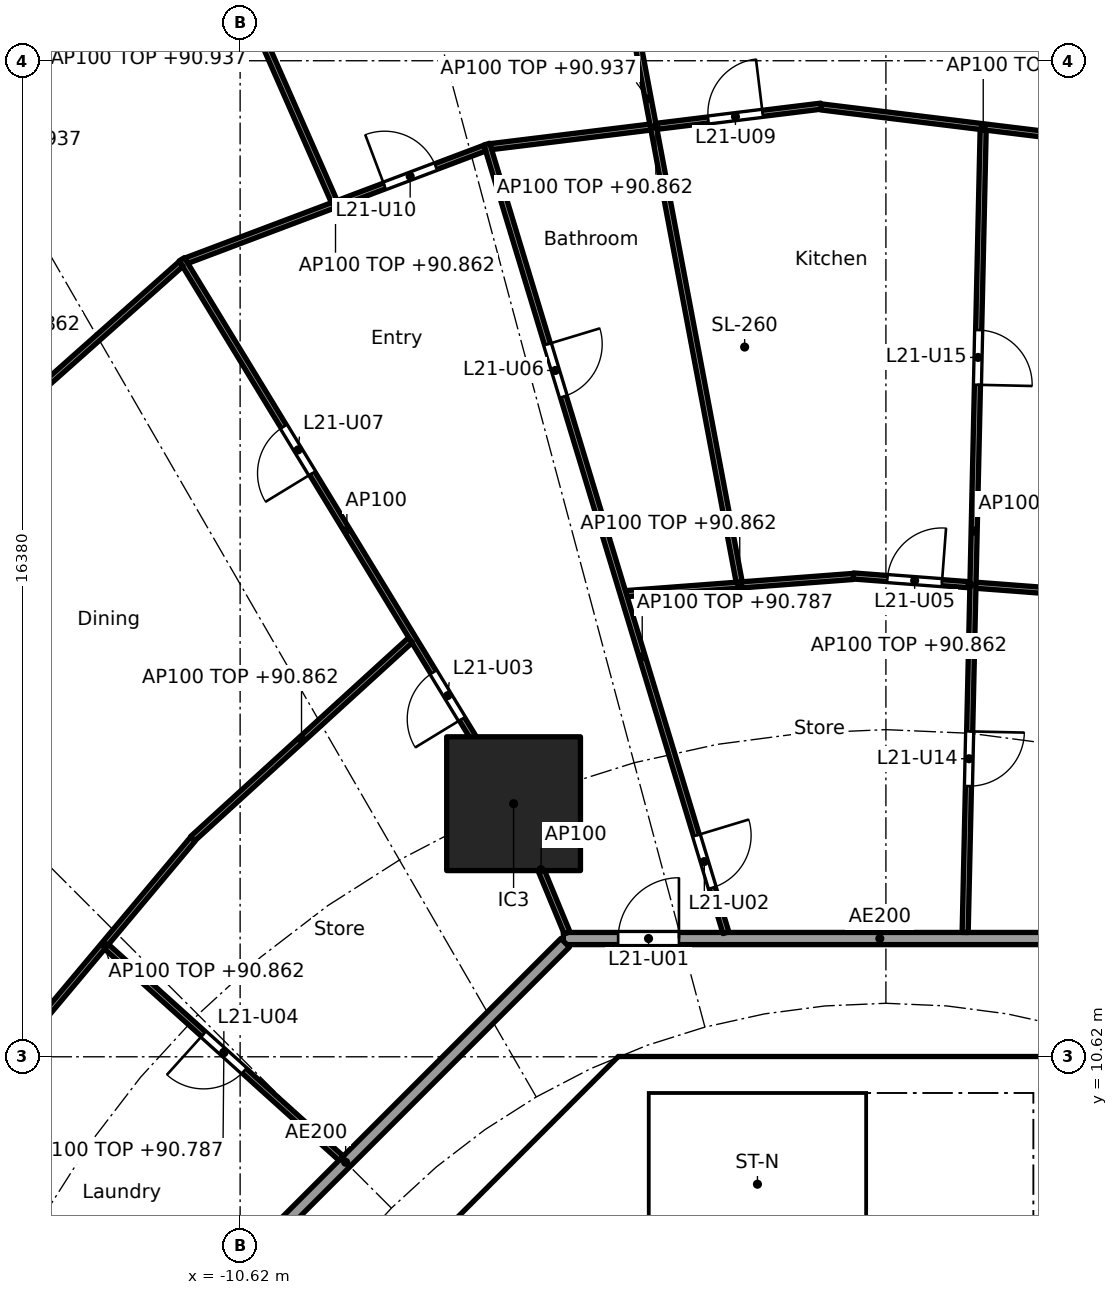
"""IFC4 building model, lengths in metres.
Left out: names, types, materials, properties, quantities, classifications, styles, units other than length and angle.
Written with IfcOpenShell. Run it as: python <this file> out.ifc"""

import sys

from ifc_helpers import new_model, si_unit, direction, frame, frame_2d, origin, origin_2d, place, context, subcontext, project, spatial, polyline, rectangle, outline, extrude, element, fill, save


model = new_model("IFC4")
c1 = context("Model", 3, precision=1e-05, world=origin(), true_north=direction((0.0, 1.0)))
c2 = subcontext(c1, "Body", "Model", "MODEL_VIEW")
j1 = project(units=[si_unit("LENGTHUNIT", "METRE"), si_unit("PLANEANGLEUNIT", "RADIAN")], contexts=[c1])
p1 = place(None, origin())
s1 = spatial("IfcSite", under=j1, at=p1, CompositionType="ELEMENT")
p2 = place(p1, origin())
s2 = spatial("IfcBuilding", under=s1, at=p2, CompositionType="ELEMENT")
p3 = place(p2, frame((0.0, 0.0, 88.1)))
s3 = spatial("IfcBuildingStorey", under=s2, at=p3, CompositionType="ELEMENT", Elevation=88.1)
p4 = place(p3, frame((-6.123, 14.782, 0.0), z_axis=(0.0, 0.0, 1.0), x_axis=(1.0, 0.0, 0.0)))
e1 = element("IfcColumn", 1, at=p4, inside=s3, PredefinedType="COLUMN", context=c2, shape_type="SweptSolid", body=[
    extrude(rectangle(XDim=2.2, YDim=2.2, at=origin_2d()), origin(), (0.0, 0.0, 1.0), 3.7),
])
p5 = place(p3, frame((-4.613, 9.988, 0.0), z_axis=(0.0, 0.0, 1.0), x_axis=(-0.707106781187, -0.707106781187, 0.0)))
e2 = element("IfcWall", 2, at=p5, inside=s3, PredefinedType="SHEAR", context=c2, shape_type="SweptSolid", body=[
    extrude(rectangle(XDim=7.602, YDim=0.6, at=frame_2d((3.801, 0.0))), origin(), (0.0, 0.0, 1.0), 3.44),
])
p6 = place(p5, frame((0.351, 0.0, 0.0)))
e3 = element("IfcOpeningElement", 3, at=p6, cuts=e2, PredefinedType="OPENING", context=c2, shape_type="SweptSolid", body=[
    extrude(rectangle(XDim=1.1, YDim=2.1, at=frame_2d((0.55, 1.05))), frame((0.0, 0.31, 0.0), z_axis=(0.0, -1.0, 0.0), x_axis=(1.0, 0.0, 0.0)), (0.0, 0.0, 1.0), 0.62),
])
p7 = place(p3, frame((-5.8, 4.3, 0.0), z_axis=(0.0, 0.0, 1.0), x_axis=(0.0, 1.0, 0.0)))
e4 = element("IfcWall", 4, at=p7, inside=s3, PredefinedType="PARTITIONING", context=c2, shape_type="SweptSolid", body=[
    extrude(rectangle(XDim=3.927, YDim=0.15, at=frame_2d((1.963, 0.0))), origin(), (0.0, 0.0, 1.0), 3.44),
])
p8 = place(p7, frame((1.551, 0.0, 0.0)))
e5 = element("IfcOpeningElement", 5, at=p8, cuts=e4, PredefinedType="OPENING", context=c2, shape_type="SweptSolid", body=[
    extrude(rectangle(XDim=0.9, YDim=2.1, at=frame_2d((0.45, 1.05))), frame((0.0, 0.085, 0.0), z_axis=(0.0, -1.0, 0.0), x_axis=(1.0, 0.0, 0.0)), (0.0, 0.0, 1.0), 0.17),
])
p9 = place(p3, origin())
e6 = element("IfcWall", 6, at=p9, inside=s3, PredefinedType="SHEAR", context=c2, shape_type="SweptSolid", body=[
    extrude(outline(polyline([(-4.152, 10.025), (-4.401, 9.776), (-4.825, 10.2), (-4.401, 10.625), (4.401, 10.625), (4.825, 10.2), (4.401, 9.776), (4.152, 10.025), (-4.152, 10.025)])), origin(), (0.0, 0.0, 1.0), 3.44),
])
p10 = place(p3, origin())
e7 = element("IfcWall", 7, at=p10, inside=s3, PredefinedType="SOLIDWALL", context=c2, shape_type="SweptSolid", body=[
    extrude(outline(polyline([(-3.9, 7.025), (-4.1, 7.025), (-4.1, 10.025), (-3.9, 10.025), (-3.9, 7.025)])), origin(), (0.0, 0.0, 1.0), 3.44),
])
p11 = place(p3, frame((5.104, 12.565, 0.0), z_axis=(0.0, 0.0, 1.0), x_axis=(-1.0, 0.0, 0.0)))
e8 = element("IfcWall", 8, at=p11, inside=s3, PredefinedType="PARTITIONING", context=c2, shape_type="SweptSolid", body=[
    extrude(rectangle(XDim=10.409, YDim=0.2, at=frame_2d((5.205, 0.0))), origin(), (0.0, 0.0, 1.0), 3.44),
])
p12 = place(p11, frame((8.508, 0.0, 0.0)))
e9 = element("IfcOpeningElement", 9, at=p12, cuts=e8, PredefinedType="OPENING", context=c2, shape_type="SweptSolid", body=[
    extrude(rectangle(XDim=1.0, YDim=2.1, at=frame_2d((0.5, 1.05))), frame((0.0, 0.11, 0.0), z_axis=(0.0, -1.0, 0.0), x_axis=(1.0, 0.0, 0.0)), (0.0, 0.0, 1.0), 0.22),
])
p13 = place(p3, frame((-5.275, 12.494, 0.0), z_axis=(0.0, 0.0, 1.0), x_axis=(-0.707106781187, -0.707106781187, 0.0)))
e10 = element("IfcWall", 10, at=p13, inside=s3, PredefinedType="PARTITIONING", context=c2, shape_type="SweptSolid", body=[
    extrude(rectangle(XDim=10.209, YDim=0.2, at=frame_2d((5.104, 0.0))), origin(), (0.0, 0.0, 1.0), 3.44),
])
p14 = place(p3, frame((3.299, 18.237, 0.0), z_axis=(0.0, 0.0, 1.0), x_axis=(-0.997152243414, 0.075414875552, 0.0)))
e11 = element("IfcWall", 11, at=p14, inside=s3, PredefinedType="PARTITIONING", context=c2, shape_type="SweptSolid", body=[
    extrude(rectangle(XDim=3.846, YDim=0.1, at=frame_2d((1.923, 0.0))), origin(), (0.0, 0.0, 1.0), 2.762),
])
p15 = place(p14, frame((2.385, 0.0, 0.0)))
e12 = element("IfcOpeningElement", 12, at=p15, cuts=e11, PredefinedType="OPENING", context=c2, shape_type="SweptSolid", body=[
    extrude(rectangle(XDim=0.9, YDim=2.1, at=frame_2d((0.45, 1.05))), frame((0.0, 0.06, 0.0), z_axis=(0.0, -1.0, 0.0), x_axis=(1.0, 0.0, 0.0)), (0.0, 0.0, 1.0), 0.12),
])
p16 = place(p3, frame((4.267, 25.587, 0.0), z_axis=(0.0, 0.0, 1.0), x_axis=(-0.992576206119, 0.121624319302, 0.0)))
e13 = element("IfcWall", 13, at=p16, inside=s3, PredefinedType="PARTITIONING", context=c2, shape_type="SweptSolid", body=[
    extrude(rectangle(XDim=5.374, YDim=0.1, at=frame_2d((2.687, 0.0))), origin(), (0.0, 0.0, 1.0), 2.762),
])
p17 = place(p3, frame((1.303, 12.665, 0.0), z_axis=(0.0, 0.0, 1.0), x_axis=(0.022412244057, 0.999748814111, 0.0)))
e14 = element("IfcWall", 14, at=p17, inside=s3, PredefinedType="PARTITIONING", context=c2, shape_type="SweptSolid", body=[
    extrude(rectangle(XDim=13.203, YDim=0.1, at=frame_2d((6.601, 0.0))), origin(), (0.0, 0.0, 1.0), 2.687),
])
p18 = place(p17, frame((2.407, 0.0, 0.0)))
e15 = element("IfcOpeningElement", 15, at=p18, cuts=e14, PredefinedType="OPENING", context=c2, shape_type="SweptSolid", body=[
    extrude(rectangle(XDim=0.9, YDim=2.1, at=frame_2d((0.45, 1.05))), frame((0.0, 0.06, 0.0), z_axis=(0.0, -1.0, 0.0), x_axis=(1.0, 0.0, 0.0)), (0.0, 0.0, 1.0), 0.12),
])
p19 = place(p17, frame((9.009, 0.0, 0.0)))
e16 = element("IfcOpeningElement", 16, at=p19, cuts=e14, PredefinedType="OPENING", context=c2, shape_type="SweptSolid", body=[
    extrude(rectangle(XDim=0.9, YDim=2.1, at=frame_2d((0.45, 1.05))), frame((0.0, 0.06, 0.0), z_axis=(0.0, -1.0, 0.0), x_axis=(1.0, 0.0, 0.0)), (0.0, 0.0, 1.0), 0.12),
])
p20 = place(p3, frame((-0.536, 18.519, 0.0), z_axis=(0.0, 0.0, 1.0), x_axis=(-0.99715294352, -0.075405618017, 0.0)))
e17 = element("IfcWall", 17, at=p20, inside=s3, PredefinedType="PARTITIONING", context=c2, shape_type="SweptSolid", body=[
    extrude(rectangle(XDim=3.746, YDim=0.1, at=frame_2d((1.873, 0.0))), origin(), (0.0, 0.0, 1.0), 2.762),
])
p21 = place(p3, frame((-1.066, 26.253, 0.0), z_axis=(0.0, 0.0, 1.0), x_axis=(-0.992574853421, -0.121635358166, 0.0)))
e18 = element("IfcWall", 18, at=p21, inside=s3, PredefinedType="PARTITIONING", context=c2, shape_type="SweptSolid", body=[
    extrude(rectangle(XDim=5.473, YDim=0.1, at=frame_2d((2.737, 0.0))), origin(), (0.0, 0.0, 1.0), 2.762),
])
p22 = place(p21, frame((0.969, 0.0, 0.0)))
e19 = element("IfcOpeningElement", 19, at=p22, cuts=e18, PredefinedType="OPENING", context=c2, shape_type="SweptSolid", body=[
    extrude(rectangle(XDim=0.9, YDim=2.1, at=frame_2d((0.45, 1.05))), frame((0.0, 0.06, 0.0), z_axis=(0.0, -1.0, 0.0), x_axis=(1.0, 0.0, 0.0)), (0.0, 0.0, 1.0), 0.12),
])
p23 = place(p3, frame((-2.413, 18.427, 0.0), z_axis=(0.0, 0.0, 1.0), x_axis=(-0.185126823719, 0.982714637695, 0.0)))
e20 = element("IfcWall", 20, at=p23, inside=s3, PredefinedType="PARTITIONING", context=c2, shape_type="SweptSolid", body=[
    extrude(rectangle(XDim=16.176, YDim=0.1, at=frame_2d((8.088, 0.0))), origin(), (0.0, 0.0, 1.0), 2.837),
])
p24 = place(p3, frame((-2.631, 12.66, 0.0), z_axis=(0.0, 0.0, 1.0), x_axis=(-0.290161396499, 0.956977723869, 0.0)))
e21 = element("IfcWall", 21, at=p24, inside=s3, PredefinedType="PARTITIONING", context=c2, shape_type="SweptSolid", body=[
    extrude(rectangle(XDim=13.552, YDim=0.1, at=frame_2d((6.776, 0.0))), origin(), (0.0, 0.0, 1.0), 2.687),
])
p25 = place(p24, frame((0.772, 0.0, 0.0)))
e22 = element("IfcOpeningElement", 22, at=p25, cuts=e21, PredefinedType="OPENING", context=c2, shape_type="SweptSolid", body=[
    extrude(rectangle(XDim=0.9, YDim=2.1, at=frame_2d((0.45, 1.05))), frame((0.0, 0.06, 0.0), z_axis=(0.0, -1.0, 0.0), x_axis=(1.0, 0.0, 0.0)), (0.0, 0.0, 1.0), 0.12),
])
p26 = place(p24, frame((9.212, 0.0, 0.0)))
e23 = element("IfcOpeningElement", 23, at=p26, cuts=e21, PredefinedType="OPENING", context=c2, shape_type="SweptSolid", body=[
    extrude(rectangle(XDim=0.9, YDim=2.1, at=frame_2d((0.45, 1.05))), frame((0.0, 0.06, 0.0), z_axis=(0.0, -1.0, 0.0), x_axis=(1.0, 0.0, 0.0)), (0.0, 0.0, 1.0), 0.12),
])
p27 = place(p3, frame((-6.596, 25.563, 0.0), z_axis=(0.0, 0.0, 1.0), x_axis=(-0.9356162121, -0.353018843201, 0.0)))
e24 = element("IfcWall", 24, at=p27, inside=s3, PredefinedType="PARTITIONING", context=c2, shape_type="SweptSolid", body=[
    extrude(rectangle(XDim=5.249, YDim=0.1, at=frame_2d((2.625, 0.0))), origin(), (0.0, 0.0, 1.0), 2.762),
])
p28 = place(p27, frame((0.862, 0.0, 0.0)))
e25 = element("IfcOpeningElement", 25, at=p28, cuts=e24, PredefinedType="OPENING", context=c2, shape_type="SweptSolid", body=[
    extrude(rectangle(XDim=0.9, YDim=2.1, at=frame_2d((0.45, 1.05))), frame((0.0, 0.06, 0.0), z_axis=(0.0, -1.0, 0.0), x_axis=(1.0, 0.0, 0.0)), (0.0, 0.0, 1.0), 0.12),
])
p29 = place(p3, frame((-9.072, 24.683, 0.0), z_axis=(0.0, 0.0, 1.0), x_axis=(-0.403192911159, 0.915115007194, 0.0)))
e26 = element("IfcWall", 26, at=p29, inside=s3, PredefinedType="PARTITIONING", context=c2, shape_type="SweptSolid", body=[
    extrude(rectangle(XDim=8.211, YDim=0.1, at=frame_2d((4.106, 0.0))), origin(), (0.0, 0.0, 1.0), 2.837),
])
p30 = place(p29, frame((3.656, 0.0, 0.0)))
e27 = element("IfcOpeningElement", 27, at=p30, cuts=e26, PredefinedType="OPENING", context=c2, shape_type="SweptSolid", body=[
    extrude(rectangle(XDim=0.9, YDim=2.1, at=frame_2d((0.45, 1.05))), frame((0.0, 0.06, 0.0), z_axis=(0.0, -1.0, 0.0), x_axis=(1.0, 0.0, 0.0)), (0.0, 0.0, 1.0), 0.12),
])
p31 = place(p3, frame((-5.243, 12.657, 0.0), z_axis=(0.0, 0.0, 1.0), x_axis=(-0.382703272338, 0.923871314276, 0.0)))
e28 = element("IfcWall", 28, at=p31, inside=s3, PredefinedType="PARTITIONING", context=c2, shape_type="SweptSolid", body=[
    extrude(rectangle(XDim=2.249, YDim=0.1, at=frame_2d((1.125, 0.0))), origin(), (0.0, 0.0, 1.0), 3.44),
])
p32 = place(p3, frame((-6.149, 14.825, 0.0), z_axis=(0.0, 0.0, 1.0), x_axis=(-0.520411490252, 0.853915616917, 0.0)))
e29 = element("IfcWall", 29, at=p32, inside=s3, PredefinedType="PARTITIONING", context=c2, shape_type="SweptSolid", body=[
    extrude(rectangle(XDim=10.435, YDim=0.1, at=frame_2d((5.218, 0.0))), origin(), (0.0, 0.0, 1.0), 3.44),
])
p33 = place(p32, frame((1.582, 0.0, 0.0)))
e30 = element("IfcOpeningElement", 30, at=p33, cuts=e29, PredefinedType="OPENING", context=c2, shape_type="SweptSolid", body=[
    extrude(rectangle(XDim=0.9, YDim=2.1, at=frame_2d((0.45, 1.05))), frame((0.0, 0.06, 0.0), z_axis=(0.0, -1.0, 0.0), x_axis=(1.0, 0.0, 0.0)), (0.0, 0.0, 1.0), 0.12),
])
p34 = place(p32, frame((6.312, 0.0, 0.0)))
e31 = element("IfcOpeningElement", 31, at=p34, cuts=e29, PredefinedType="OPENING", context=c2, shape_type="SweptSolid", body=[
    extrude(rectangle(XDim=0.9, YDim=2.1, at=frame_2d((0.45, 1.05))), frame((0.0, 0.06, 0.0), z_axis=(0.0, -1.0, 0.0), x_axis=(1.0, 0.0, 0.0)), (0.0, 0.0, 1.0), 0.12),
])
p35 = place(p3, frame((-7.82, 17.472, 0.0), z_axis=(0.0, 0.0, 1.0), x_axis=(-0.73885182489, -0.67386792538, 0.0)))
e32 = element("IfcWall", 32, at=p35, inside=s3, PredefinedType="PARTITIONING", context=c2, shape_type="SweptSolid", body=[
    extrude(rectangle(XDim=4.846, YDim=0.1, at=frame_2d((2.423, 0.0))), origin(), (0.0, 0.0, 1.0), 2.762),
])
p36 = place(p3, frame((-11.591, 23.66, 0.0), z_axis=(0.0, 0.0, 1.0), x_axis=(-0.747429278403, -0.664341383466, 0.0)))
e33 = element("IfcWall", 33, at=p36, inside=s3, PredefinedType="PARTITIONING", context=c2, shape_type="SweptSolid", body=[
    extrude(rectangle(XDim=6.073, YDim=0.1, at=frame_2d((3.037, 0.0))), origin(), (0.0, 0.0, 1.0), 2.762),
])
p37 = place(p3, frame((-11.396, 14.202, 0.0), z_axis=(0.0, 0.0, 1.0), x_axis=(-0.642483859922, -0.766299216847, 0.0)))
e34 = element("IfcWall", 34, at=p37, inside=s3, PredefinedType="PARTITIONING", context=c2, shape_type="SweptSolid", body=[
    extrude(rectangle(XDim=4.537, YDim=0.1, at=frame_2d((2.269, 0.0))), origin(), (0.0, 0.0, 1.0), 2.762),
])
p38 = place(p3, frame((-8.959, 8.952, 0.0), z_axis=(0.0, 0.0, 1.0), x_axis=(-0.742686144764, 0.669639672045, 0.0)))
e35 = element("IfcWall", 35, at=p38, inside=s3, PredefinedType="PARTITIONING", context=c2, shape_type="SweptSolid", body=[
    extrude(rectangle(XDim=5.194, YDim=0.1, at=frame_2d((2.597, 0.0))), origin(), (0.0, 0.0, 1.0), 2.687),
])
p39 = place(p38, frame((2.147, 0.0, 0.0)))
e36 = element("IfcOpeningElement", 36, at=p39, cuts=e35, PredefinedType="OPENING", context=c2, shape_type="SweptSolid", body=[
    extrude(rectangle(XDim=0.9, YDim=2.1, at=frame_2d((0.45, 1.05))), frame((0.0, 0.06, 0.0), z_axis=(0.0, -1.0, 0.0), x_axis=(1.0, 0.0, 0.0)), (0.0, 0.0, 1.0), 0.12),
])
p40 = place(p6, origin())
e37 = element("IfcDoor", 37, at=p40, inside=s3, OperationType="SINGLE_SWING_LEFT", PredefinedType="DOOR", context=c2, shape_type="SweptSolid", body=[
    extrude(rectangle(XDim=1.1, YDim=2.1, at=frame_2d((0.55, 1.05))), frame((0.0, 0.025, 0.0), z_axis=(0.0, -1.0, 0.0), x_axis=(1.0, 0.0, 0.0)), (0.0, 0.0, 1.0), 0.05),
])
fill(e3, e37)
p41 = place(p12, frame((1.0, 0.0, 0.0), x_axis=(-1.0, 0.0, 0.0)))
e38 = element("IfcDoor", 38, at=p41, inside=s3, OperationType="SINGLE_SWING_RIGHT", PredefinedType="DOOR", context=c2, shape_type="SweptSolid", body=[
    extrude(rectangle(XDim=1.0, YDim=2.1, at=frame_2d((0.5, 1.05))), frame((0.0, 0.025, 0.0), z_axis=(0.0, -1.0, 0.0), x_axis=(1.0, 0.0, 0.0)), (0.0, 0.0, 1.0), 0.05),
])
fill(e9, e38)
p42 = place(p25, frame((0.9, 0.0, 0.0), x_axis=(-1.0, 0.0, 0.0)))
e39 = element("IfcDoor", 39, at=p42, inside=s3, OperationType="SINGLE_SWING_LEFT", PredefinedType="DOOR", context=c2, shape_type="SweptSolid", body=[
    extrude(rectangle(XDim=0.9, YDim=2.1, at=frame_2d((0.45, 1.05))), frame((0.0, 0.025, 0.0), z_axis=(0.0, -1.0, 0.0), x_axis=(1.0, 0.0, 0.0)), (0.0, 0.0, 1.0), 0.05),
])
fill(e22, e39)
p43 = place(p33, origin())
e40 = element("IfcDoor", 40, at=p43, inside=s3, OperationType="SINGLE_SWING_LEFT", PredefinedType="DOOR", context=c2, shape_type="SweptSolid", body=[
    extrude(rectangle(XDim=0.9, YDim=2.1, at=frame_2d((0.45, 1.05))), frame((0.0, 0.025, 0.0), z_axis=(0.0, -1.0, 0.0), x_axis=(1.0, 0.0, 0.0)), (0.0, 0.0, 1.0), 0.05),
])
fill(e30, e40)
p44 = place(p39, origin())
e41 = element("IfcDoor", 41, at=p44, inside=s3, OperationType="SINGLE_SWING_RIGHT", PredefinedType="DOOR", context=c2, shape_type="SweptSolid", body=[
    extrude(rectangle(XDim=0.9, YDim=2.1, at=frame_2d((0.45, 1.05))), frame((0.0, 0.025, 0.0), z_axis=(0.0, -1.0, 0.0), x_axis=(1.0, 0.0, 0.0)), (0.0, 0.0, 1.0), 0.05),
])
fill(e36, e41)
p45 = place(p15, frame((0.9, 0.0, 0.0), x_axis=(-1.0, 0.0, 0.0)))
e42 = element("IfcDoor", 42, at=p45, inside=s3, OperationType="SINGLE_SWING_RIGHT", PredefinedType="DOOR", context=c2, shape_type="SweptSolid", body=[
    extrude(rectangle(XDim=0.9, YDim=2.1, at=frame_2d((0.45, 1.05))), frame((0.0, 0.025, 0.0), z_axis=(0.0, -1.0, 0.0), x_axis=(1.0, 0.0, 0.0)), (0.0, 0.0, 1.0), 0.05),
])
fill(e12, e42)
p46 = place(p26, frame((0.9, 0.0, 0.0), x_axis=(-1.0, 0.0, 0.0)))
e43 = element("IfcDoor", 43, at=p46, inside=s3, OperationType="SINGLE_SWING_LEFT", PredefinedType="DOOR", context=c2, shape_type="SweptSolid", body=[
    extrude(rectangle(XDim=0.9, YDim=2.1, at=frame_2d((0.45, 1.05))), frame((0.0, 0.025, 0.0), z_axis=(0.0, -1.0, 0.0), x_axis=(1.0, 0.0, 0.0)), (0.0, 0.0, 1.0), 0.05),
])
fill(e23, e43)
p47 = place(p34, origin())
e44 = element("IfcDoor", 44, at=p47, inside=s3, OperationType="SINGLE_SWING_LEFT", PredefinedType="DOOR", context=c2, shape_type="SweptSolid", body=[
    extrude(rectangle(XDim=0.9, YDim=2.1, at=frame_2d((0.45, 1.05))), frame((0.0, 0.025, 0.0), z_axis=(0.0, -1.0, 0.0), x_axis=(1.0, 0.0, 0.0)), (0.0, 0.0, 1.0), 0.05),
])
fill(e31, e44)
p48 = place(p22, frame((0.9, 0.0, 0.0), x_axis=(-1.0, 0.0, 0.0)))
e45 = element("IfcDoor", 45, at=p48, inside=s3, OperationType="SINGLE_SWING_RIGHT", PredefinedType="DOOR", context=c2, shape_type="SweptSolid", body=[
    extrude(rectangle(XDim=0.9, YDim=2.1, at=frame_2d((0.45, 1.05))), frame((0.0, 0.025, 0.0), z_axis=(0.0, -1.0, 0.0), x_axis=(1.0, 0.0, 0.0)), (0.0, 0.0, 1.0), 0.05),
])
fill(e19, e45)
p49 = place(p28, frame((0.9, 0.0, 0.0), x_axis=(-1.0, 0.0, 0.0)))
e46 = element("IfcDoor", 46, at=p49, inside=s3, OperationType="SINGLE_SWING_LEFT", PredefinedType="DOOR", context=c2, shape_type="SweptSolid", body=[
    extrude(rectangle(XDim=0.9, YDim=2.1, at=frame_2d((0.45, 1.05))), frame((0.0, 0.025, 0.0), z_axis=(0.0, -1.0, 0.0), x_axis=(1.0, 0.0, 0.0)), (0.0, 0.0, 1.0), 0.05),
])
fill(e25, e46)
p50 = place(p18, frame((0.9, 0.0, 0.0), x_axis=(-1.0, 0.0, 0.0)))
e47 = element("IfcDoor", 47, at=p50, inside=s3, OperationType="SINGLE_SWING_LEFT", PredefinedType="DOOR", context=c2, shape_type="SweptSolid", body=[
    extrude(rectangle(XDim=0.9, YDim=2.1, at=frame_2d((0.45, 1.05))), frame((0.0, 0.025, 0.0), z_axis=(0.0, -1.0, 0.0), x_axis=(1.0, 0.0, 0.0)), (0.0, 0.0, 1.0), 0.05),
])
fill(e15, e47)
p51 = place(p19, frame((0.9, 0.0, 0.0), x_axis=(-1.0, 0.0, 0.0)))
e48 = element("IfcDoor", 48, at=p51, inside=s3, OperationType="SINGLE_SWING_RIGHT", PredefinedType="DOOR", context=c2, shape_type="SweptSolid", body=[
    extrude(rectangle(XDim=0.9, YDim=2.1, at=frame_2d((0.45, 1.05))), frame((0.0, 0.025, 0.0), z_axis=(0.0, -1.0, 0.0), x_axis=(1.0, 0.0, 0.0)), (0.0, 0.0, 1.0), 0.05),
])
fill(e16, e48)
save(model, sys.argv[1])
